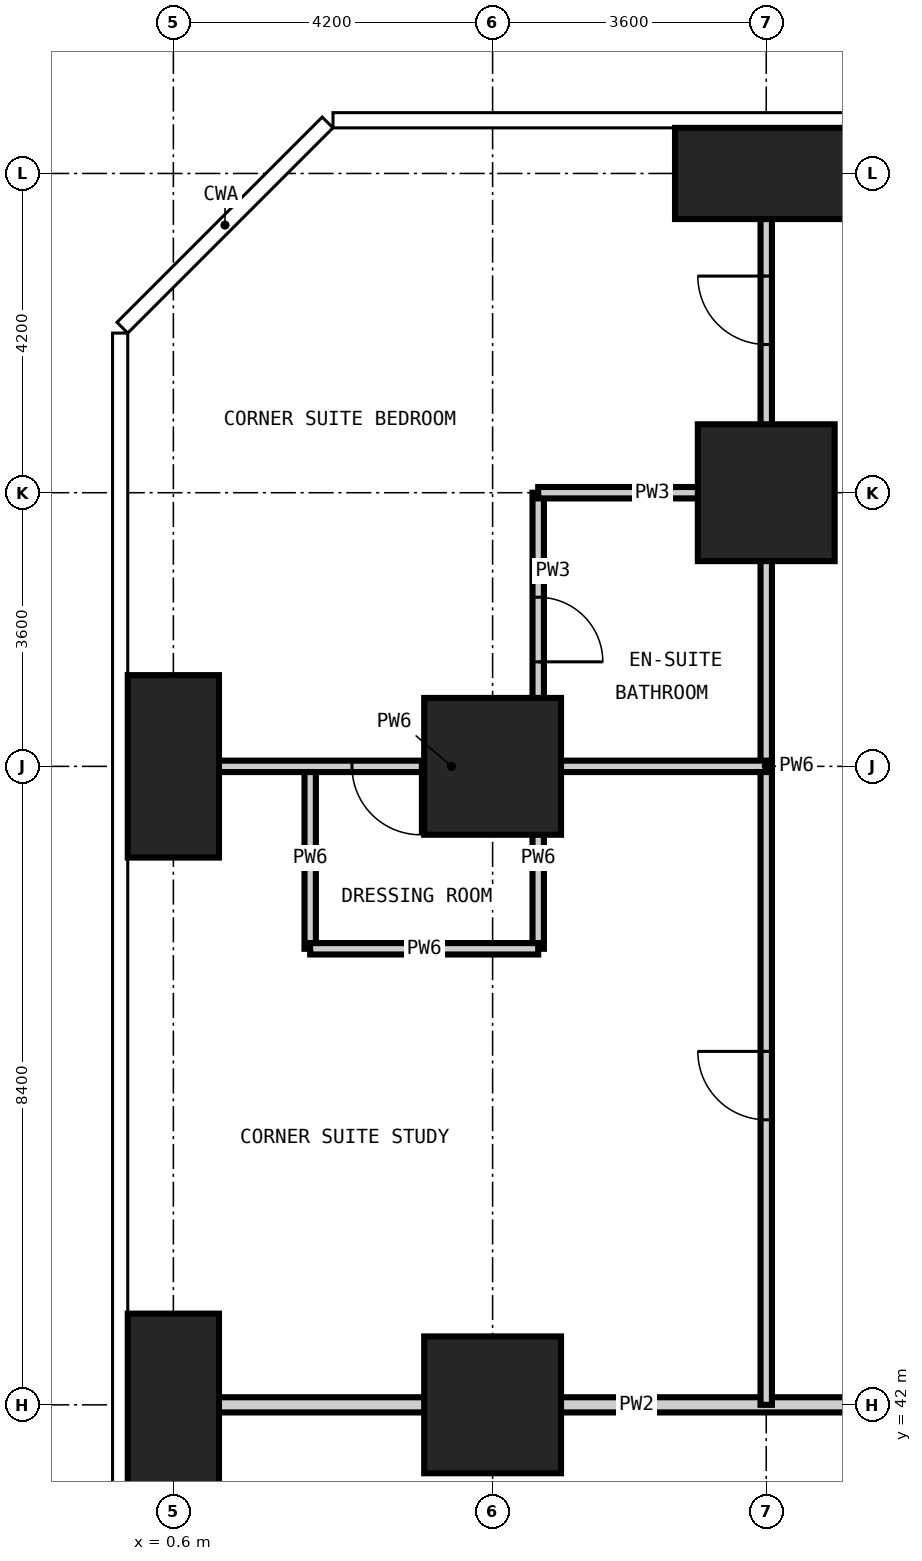
"""IFC4 building model, lengths in metres.
Left out: names, types, materials, properties, quantities, classifications, styles, units other than length and angle.
Written with IfcOpenShell. Run it as: python <this file> out.ifc"""

import sys

from ifc_helpers import new_model, si_unit, direction, frame, frame_2d, origin, origin_2d, place, context, subcontext, project, spatial, rectangle, extrude, element, fill, save


model = new_model("IFC4")
c1 = context("Model", 3, precision=1e-05, world=origin(), true_north=direction((0.0, 1.0)))
c2 = subcontext(c1, "Body", "Model", "MODEL_VIEW")
j1 = project(units=[si_unit("LENGTHUNIT", "METRE"), si_unit("PLANEANGLEUNIT", "RADIAN")], contexts=[c1])
p1 = place(None, origin())
s1 = spatial("IfcSite", under=j1, at=p1, CompositionType="ELEMENT")
p2 = place(p1, origin())
s2 = spatial("IfcBuilding", under=s1, at=p2, CompositionType="ELEMENT")
p3 = place(p2, frame((0.0, 0.0, 27.0)))
s3 = spatial("IfcBuildingStorey", under=s2, at=p3, CompositionType="ELEMENT", Elevation=27.0)
for number, where, z_axis, x_axis in (
    (1, (0.6, 42.0, -0.35), (0.0, 0.0, 1.0), (1.0, 0.0, 0.0)),
    (2, (0.6, 50.4, -0.35), (0.0, 0.0, 1.0), (1.0, 0.0, 0.0)),
):
    element("IfcColumn", number, at=place(p3, frame(where, z_axis=z_axis, x_axis=x_axis)), inside=s3, PredefinedType="COLUMN", context=c2, shape_type="SweptSolid", body=[
        extrude(rectangle(XDim=1.2, YDim=2.4, at=origin_2d()), origin(), (0.0, 0.0, 1.0), 3.6),
    ])
for number, where, z_axis, x_axis in (
    (3, (4.8, 42.0, -0.35), (0.0, 0.0, 1.0), (1.0, 0.0, 0.0)),
    (4, (4.8, 50.4, -0.35), (0.0, 0.0, 1.0), (1.0, 0.0, 0.0)),
    (5, (8.4, 54.0, -0.35), (0.0, 0.0, 1.0), (1.0, 0.0, 0.0)),
):
    element("IfcColumn", number, at=place(p3, frame(where, z_axis=z_axis, x_axis=x_axis)), inside=s3, PredefinedType="COLUMN", context=c2, shape_type="SweptSolid", body=[
        extrude(rectangle(XDim=1.8, YDim=1.8, at=origin_2d()), origin(), (0.0, 0.0, 1.0), 3.6),
    ])
p4 = place(p3, frame((8.4, 58.2, -0.35), z_axis=(0.0, 0.0, 1.0), x_axis=(1.0, 0.0, 0.0)))
e6 = element("IfcColumn", 6, at=p4, inside=s3, PredefinedType="COLUMN", context=c2, shape_type="SweptSolid", body=[
    extrude(rectangle(XDim=2.4, YDim=1.2, at=origin_2d()), origin(), (0.0, 0.0, 1.0), 3.6),
])
p5 = place(p3, frame((5.4, 50.4, 0.0), z_axis=(0.0, 0.0, 1.0), x_axis=(0.0, 1.0, 0.0)))
e7 = element("IfcWall", 7, at=p5, inside=s3, PredefinedType="PARTITIONING", context=c2, shape_type="SweptSolid", body=[
    extrude(rectangle(XDim=3.6, YDim=0.15, at=frame_2d((1.8, 0.0))), origin(), (0.0, 0.0, 1.0), 3.25),
])
p6 = place(p5, frame((1.375, 0.0, 0.0)))
e8 = element("IfcOpeningElement", 8, at=p6, cuts=e7, PredefinedType="OPENING", context=c2, shape_type="SweptSolid", body=[
    extrude(rectangle(XDim=0.85, YDim=2.1, at=frame_2d((0.425, 1.05))), frame((0.0, 0.085, 0.0), z_axis=(0.0, -1.0, 0.0), x_axis=(1.0, 0.0, 0.0)), (0.0, 0.0, 1.0), 0.17),
])
p7 = place(p3, frame((5.4, 54.0, 0.0), z_axis=(0.0, 0.0, 1.0), x_axis=(1.0, 0.0, 0.0)))
e9 = element("IfcWall", 9, at=p7, inside=s3, PredefinedType="PARTITIONING", context=c2, shape_type="SweptSolid", body=[
    extrude(rectangle(XDim=3.0, YDim=0.15, at=frame_2d((1.5, 0.0))), origin(), (0.0, 0.0, 1.0), 3.25),
])
p8 = place(p3, frame((-0.008, 42.0, 0.0), z_axis=(0.0, 0.0, 1.0), x_axis=(1.0, 0.0, 0.0)))
e10 = element("IfcWall", 10, at=p8, inside=s3, PredefinedType="PARTITIONING", context=c2, shape_type="SweptSolid", body=[
    extrude(rectangle(XDim=13.408, YDim=0.2, at=frame_2d((6.704, 0.0))), origin(), (0.0, 0.0, 1.0), 3.25),
])
for number, where, z_axis, x_axis in (
    (11, (2.4, 48.0, 0.0), (0.0, 0.0, 1.0), (0.0, 1.0, 0.0)),
    (12, (5.4, 48.0, 0.0), (0.0, 0.0, 1.0), (0.0, 1.0, 0.0)),
):
    element("IfcWall", number, at=place(p3, frame(where, z_axis=z_axis, x_axis=x_axis)), inside=s3, PredefinedType="PARTITIONING", context=c2, shape_type="SweptSolid", body=[
        extrude(rectangle(XDim=2.4, YDim=0.15, at=frame_2d((1.2, 0.0))), origin(), (0.0, 0.0, 1.0), 3.25),
    ])
p9 = place(p3, frame((8.4, 42.0, 0.0), z_axis=(0.0, 0.0, 1.0), x_axis=(0.0, 1.0, 0.0)))
e13 = element("IfcWall", 13, at=p9, inside=s3, PredefinedType="PARTITIONING", context=c2, shape_type="SweptSolid", body=[
    extrude(rectangle(XDim=16.808, YDim=0.15, at=frame_2d((8.404, 0.0))), origin(), (0.0, 0.0, 1.0), 3.25),
])
p10 = place(p9, frame((13.95, 0.0, 0.0)))
e14 = element("IfcOpeningElement", 14, at=p10, cuts=e13, PredefinedType="OPENING", context=c2, shape_type="SweptSolid", body=[
    extrude(rectangle(XDim=0.9, YDim=2.1, at=frame_2d((0.45, 1.05))), frame((0.0, 0.085, 0.0), z_axis=(0.0, -1.0, 0.0), x_axis=(1.0, 0.0, 0.0)), (0.0, 0.0, 1.0), 0.17),
])
p11 = place(p9, frame((3.75, 0.0, 0.0)))
e15 = element("IfcOpeningElement", 15, at=p11, cuts=e13, PredefinedType="OPENING", context=c2, shape_type="SweptSolid", body=[
    extrude(rectangle(XDim=0.9, YDim=2.1, at=frame_2d((0.45, 1.05))), frame((0.0, 0.085, 0.0), z_axis=(0.0, -1.0, 0.0), x_axis=(1.0, 0.0, 0.0)), (0.0, 0.0, 1.0), 0.17),
])
p12 = place(p3, frame((2.4, 48.0, 0.0), z_axis=(0.0, 0.0, 1.0), x_axis=(1.0, 0.0, 0.0)))
e16 = element("IfcWall", 16, at=p12, inside=s3, PredefinedType="PARTITIONING", context=c2, shape_type="SweptSolid", body=[
    extrude(rectangle(XDim=3.0, YDim=0.15, at=frame_2d((1.5, 0.0))), origin(), (0.0, 0.0, 1.0), 3.25),
])
p13 = place(p3, frame((-0.008, 50.4, 0.0), z_axis=(0.0, 0.0, 1.0), x_axis=(1.0, 0.0, 0.0)))
e17 = element("IfcWall", 17, at=p13, inside=s3, PredefinedType="PARTITIONING", context=c2, shape_type="SweptSolid", body=[
    extrude(rectangle(XDim=8.408, YDim=0.15, at=frame_2d((4.204, 0.0))), origin(), (0.0, 0.0, 1.0), 3.25),
])
p14 = place(p13, frame((2.958, 0.0, 0.0)))
e18 = element("IfcOpeningElement", 18, at=p14, cuts=e17, PredefinedType="OPENING", context=c2, shape_type="SweptSolid", body=[
    extrude(rectangle(XDim=0.9, YDim=2.1, at=frame_2d((0.45, 1.05))), frame((0.0, 0.085, 0.0), z_axis=(0.0, -1.0, 0.0), x_axis=(1.0, 0.0, 0.0)), (0.0, 0.0, 1.0), 0.17),
])
p15 = place(p10, origin())
e19 = element("IfcDoor", 19, at=p15, inside=s3, OperationType="SINGLE_SWING_RIGHT", PredefinedType="DOOR", context=c2, shape_type="SweptSolid", body=[
    extrude(rectangle(XDim=0.9, YDim=2.1, at=frame_2d((0.45, 1.05))), frame((0.0, 0.025, 0.0), z_axis=(0.0, -1.0, 0.0), x_axis=(1.0, 0.0, 0.0)), (0.0, 0.0, 1.0), 0.05),
])
fill(e14, e19)
p16 = place(p6, frame((0.85, 0.0, 0.0), z_axis=(0.0, 0.0, 1.0), x_axis=(-1.0, 0.0, 0.0)))
e20 = element("IfcDoor", 20, at=p16, inside=s3, OperationType="SINGLE_SWING_RIGHT", PredefinedType="DOOR", context=c2, shape_type="SweptSolid", body=[
    extrude(rectangle(XDim=0.85, YDim=2.1, at=frame_2d((0.425, 1.05))), frame((0.0, 0.025, 0.0), z_axis=(0.0, -1.0, 0.0), x_axis=(1.0, 0.0, 0.0)), (0.0, 0.0, 1.0), 0.05),
])
fill(e8, e20)
p17 = place(p14, frame((0.9, 0.0, 0.0), z_axis=(0.0, 0.0, 1.0), x_axis=(-1.0, 0.0, 0.0)))
e21 = element("IfcDoor", 21, at=p17, inside=s3, OperationType="SINGLE_SWING_LEFT", PredefinedType="DOOR", context=c2, shape_type="SweptSolid", body=[
    extrude(rectangle(XDim=0.9, YDim=2.1, at=frame_2d((0.45, 1.05))), frame((0.0, 0.025, 0.0), z_axis=(0.0, -1.0, 0.0), x_axis=(1.0, 0.0, 0.0)), (0.0, 0.0, 1.0), 0.05),
])
fill(e18, e21)
p18 = place(p11, origin())
e22 = element("IfcDoor", 22, at=p18, inside=s3, OperationType="SINGLE_SWING_RIGHT", PredefinedType="DOOR", context=c2, shape_type="SweptSolid", body=[
    extrude(rectangle(XDim=0.9, YDim=2.1, at=frame_2d((0.45, 1.05))), frame((0.0, 0.025, 0.0), z_axis=(0.0, -1.0, 0.0), x_axis=(1.0, 0.0, 0.0)), (0.0, 0.0, 1.0), 0.05),
])
fill(e15, e22)
save(model, sys.argv[1])
